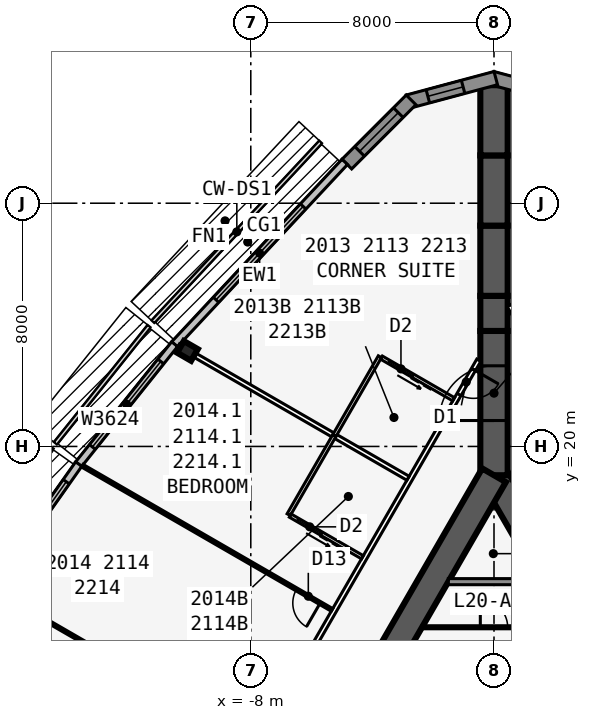
"""IFC4 building model, lengths in metres.
Left out: names, types, materials, properties, quantities, classifications, styles, units other than length and angle.
Written with IfcOpenShell. Run it as: python <this file> out.ifc"""

import sys

from ifc_helpers import new_model, si_unit, direction, frame, frame_2d, origin, origin_2d, place, context, subcontext, project, spatial, polyline, rectangle, i_section, outline, extrude, element, fill, save


model = new_model("IFC4")
c1 = context("Model", 3, precision=1e-05, world=origin(), true_north=direction((0.0, 1.0)))
c2 = subcontext(c1, "Body", "Model", "MODEL_VIEW")
j1 = project(units=[si_unit("LENGTHUNIT", "METRE"), si_unit("PLANEANGLEUNIT", "RADIAN")], contexts=[c1])
p1 = place(None, origin())
s1 = spatial("IfcSite", under=j1, at=p1, CompositionType="ELEMENT")
p2 = place(p1, origin())
s2 = spatial("IfcBuilding", under=s1, at=p2, CompositionType="ELEMENT")
p3 = place(p2, frame((0.0, 0.0, 79.5)))
s3 = spatial("IfcBuildingStorey", under=s2, at=p3, CompositionType="ELEMENT", Elevation=79.5)
p4 = place(p3, frame((16.5, -9.526, 0.0), z_axis=(0.0, 0.0, 1.0), x_axis=(-0.499999749417, 0.866025548458, 0.0)))
e1 = element("IfcWall", 1, at=p4, inside=s3, PredefinedType="SHEAR", context=c2, shape_type="SweptSolid", body=[
    extrude(rectangle(XDim=33.0, YDim=0.9, at=frame_2d((16.5, 0.0))), origin(), (0.0, 0.0, 1.0), 3.4),
])
p5 = place(p4, frame((14.15, 0.0, 0.0)))
e2 = element("IfcOpeningElement", 2, at=p5, cuts=e1, PredefinedType="OPENING", context=c2, shape_type="SweptSolid", body=[
    extrude(rectangle(XDim=1.8, YDim=2.13, at=frame_2d((0.9, 1.065))), frame((0.0, 0.46, 0.0), z_axis=(0.0, -1.0, 0.0), x_axis=(1.0, 0.0, 0.0)), (0.0, 0.0, 1.0), 0.92),
])
p6 = place(p4, frame((12.6, 0.0, 0.0)))
e3 = element("IfcOpeningElement", 3, at=p6, cuts=e1, PredefinedType="OPENING", context=c2, shape_type="SweptSolid", body=[
    extrude(rectangle(XDim=1.0, YDim=2.13, at=frame_2d((0.5, 1.065))), frame((0.0, 0.46, 0.0), z_axis=(0.0, -1.0, 0.0), x_axis=(1.0, 0.0, 0.0)), (0.0, 0.0, 1.0), 0.92),
])
p7 = place(p3, frame((0.0, 19.052, 0.0), z_axis=(0.0, 0.0, 1.0), x_axis=(-0.499999749417, -0.866025548458, 0.0)))
e4 = element("IfcWall", 4, at=p7, inside=s3, PredefinedType="SHEAR", context=c2, shape_type="SweptSolid", body=[
    extrude(rectangle(XDim=33.0, YDim=0.9, at=frame_2d((16.5, 0.0))), origin(), (0.0, 0.0, 1.0), 3.4),
])
p8 = place(p7, frame((14.15, 0.0, 0.0)))
e5 = element("IfcOpeningElement", 5, at=p8, cuts=e4, PredefinedType="OPENING", context=c2, shape_type="SweptSolid", body=[
    extrude(rectangle(XDim=1.8, YDim=2.13, at=frame_2d((0.9, 1.065))), frame((0.0, 0.46, 0.0), z_axis=(0.0, -1.0, 0.0), x_axis=(1.0, 0.0, 0.0)), (0.0, 0.0, 1.0), 0.92),
])
p9 = place(p7, frame((12.6, 0.0, 0.0)))
e6 = element("IfcOpeningElement", 6, at=p9, cuts=e4, PredefinedType="OPENING", context=c2, shape_type="SweptSolid", body=[
    extrude(rectangle(XDim=1.0, YDim=2.13, at=frame_2d((0.5, 1.065))), frame((0.0, 0.46, 0.0), z_axis=(0.0, -1.0, 0.0), x_axis=(1.0, 0.0, 0.0)), (0.0, 0.0, 1.0), 0.92),
])
p10 = place(p3, frame((0.0, 19.052, 0.0), z_axis=(0.0, 0.0, 1.0), x_axis=(0.0, 1.0, 0.0)))
e7 = element("IfcWall", 7, at=p10, inside=s3, PredefinedType="SHEAR", context=c2, shape_type="SweptSolid", body=[
    extrude(rectangle(XDim=4.746, YDim=0.9, at=frame_2d((2.373, 0.0))), origin(), (0.0, 0.0, 1.0), 3.4),
])
p11 = place(p10, frame((1.8, 0.0, 0.0)))
e8 = element("IfcOpeningElement", 8, at=p11, cuts=e7, PredefinedType="OPENING", context=c2, shape_type="SweptSolid", body=[
    extrude(rectangle(XDim=1.8, YDim=2.13, at=frame_2d((0.9, 1.065))), frame((0.0, 0.46, 0.0), z_axis=(0.0, -1.0, 0.0), x_axis=(1.0, 0.0, 0.0)), (0.0, 0.0, 1.0), 0.92),
])
p12 = place(p3, frame((0.0, 23.799, 0.0), z_axis=(0.0, 0.0, 1.0), x_axis=(0.0, 1.0, 0.0)))
e9 = element("IfcWall", 9, at=p12, inside=s3, PredefinedType="SHEAR", context=c2, shape_type="SweptSolid", body=[
    extrude(rectangle(XDim=1.155, YDim=0.9, at=frame_2d((0.577, 0.0))), origin(), (0.0, 0.0, 1.0), 3.4),
])
p13 = place(p3, frame((0.0, 24.953, 0.0), z_axis=(0.0, 0.0, 1.0), x_axis=(0.0, 1.0, 0.0)))
e10 = element("IfcWall", 10, at=p13, inside=s3, PredefinedType="SHEAR", context=c2, shape_type="SweptSolid", body=[
    extrude(rectangle(XDim=2.309, YDim=0.9, at=frame_2d((1.155, 0.0))), origin(), (0.0, 0.0, 1.0), 3.4),
])
p14 = place(p3, frame((0.0, 27.263, 0.0), z_axis=(0.0, 0.0, 1.0), x_axis=(0.0, 1.0, 0.0)))
e11 = element("IfcWall", 11, at=p14, inside=s3, PredefinedType="SHEAR", context=c2, shape_type="SweptSolid", body=[
    extrude(rectangle(XDim=2.31, YDim=0.9, at=frame_2d((1.155, 0.0))), origin(), (0.0, 0.0, 1.0), 3.4),
])
p15 = place(p3, frame((0.0, 29.572, 0.0), z_axis=(0.0, 0.0, 1.0), x_axis=(0.0, 1.0, 0.0)))
e12 = element("IfcWall", 12, at=p15, inside=s3, PredefinedType="SHEAR", context=c2, shape_type="SweptSolid", body=[
    extrude(rectangle(XDim=2.309, YDim=0.9, at=frame_2d((1.155, 0.0))), origin(), (0.0, 0.0, 1.0), 3.4),
])
p16 = place(p3, frame((-10.083, 23.142, 0.0), z_axis=(0.0, 0.0, 1.0), x_axis=(-0.5, -0.866025403784, 0.0)))
e13 = element("IfcColumn", 13, at=p16, inside=s3, PredefinedType="COLUMN", context=c2, shape_type="SweptSolid", body=[
    extrude(i_section(OverallWidth=0.442, OverallDepth=0.531, WebThickness=0.066, FlangeThickness=0.106, at=origin_2d()), origin(), (0.0, 0.0, 1.0), 3.4),
])
p17 = place(p3, frame((2.829, 31.341, 0.0), z_axis=(0.0, 0.0, 1.0), x_axis=(-0.965930548995, 0.258801419081, 0.0)))
e14 = element("IfcWall", 14, at=p17, inside=s3, PredefinedType="SOLIDWALL", context=c2, shape_type="SweptSolid", body=[
    extrude(outline(polyline([(2.989, 0.225), (2.929, 0.225), (2.438, 0.093), (2.402, 0.225), (0.0, 0.225), (0.0, -0.225), (2.989, -0.225), (2.989, 0.225)])), origin(), (0.0, 0.0, 1.0), 3.235),
])
p18 = place(p17, frame((0.676, 0.0, 0.45)))
e15 = element("IfcOpeningElement", 15, at=p18, cuts=e14, PredefinedType="OPENING", context=c2, shape_type="SweptSolid", body=[
    extrude(rectangle(XDim=1.2, YDim=2.4, at=frame_2d((0.6, 1.2))), frame((0.0, 0.235, 0.0), z_axis=(0.0, -1.0, 0.0), x_axis=(1.0, 0.0, 0.0)), (0.0, 0.0, 1.0), 0.47),
])
p19 = place(p3, frame((0.058, 32.114, 0.0), z_axis=(0.0, 0.0, 1.0), x_axis=(-0.965930548995, -0.258801419081, 0.0)))
e16 = element("IfcWall", 16, at=p19, inside=s3, PredefinedType="SOLIDWALL", context=c2, shape_type="SweptSolid", body=[
    extrude(outline(polyline([(2.989, 0.225), (0.586, 0.225), (0.551, 0.093), (0.059, 0.225), (0.0, 0.225), (0.0, -0.225), (2.989, -0.225), (2.989, 0.225)])), origin(), (0.0, 0.0, 1.0), 3.235),
])
p20 = place(p19, frame((1.113, 0.0, 0.45)))
e17 = element("IfcOpeningElement", 17, at=p20, cuts=e16, PredefinedType="OPENING", context=c2, shape_type="SweptSolid", body=[
    extrude(rectangle(XDim=1.2, YDim=2.4, at=frame_2d((0.6, 1.2))), frame((0.0, 0.235, 0.0), z_axis=(0.0, -1.0, 0.0), x_axis=(1.0, 0.0, 0.0)), (0.0, 0.0, 1.0), 0.47),
])
p21 = place(p3, frame((-2.728, 31.399, 0.0), z_axis=(0.0, 0.0, 1.0), x_axis=(-0.707106781187, -0.707106781187, 0.0)))
e18 = element("IfcWall", 18, at=p21, inside=s3, PredefinedType="SOLIDWALL", context=c2, shape_type="SweptSolid", body=[
    extrude(rectangle(XDim=2.988, YDim=0.45, at=frame_2d((1.494, 0.0))), origin(), (0.0, 0.0, 1.0), 3.235),
])
p22 = place(p21, frame((0.594, 0.0, 0.45)))
e19 = element("IfcOpeningElement", 19, at=p22, cuts=e18, PredefinedType="OPENING", context=c2, shape_type="SweptSolid", body=[
    extrude(rectangle(XDim=1.8, YDim=2.4, at=frame_2d((0.9, 1.2))), frame((0.0, 0.235, 0.0), z_axis=(0.0, -1.0, 0.0), x_axis=(1.0, 0.0, 0.0)), (0.0, 0.0, 1.0), 0.47),
])
p23 = place(p3, frame((-4.909, 29.36, 0.0), z_axis=(0.0, 0.0, 1.0), x_axis=(-0.682289646561, -0.731081964075, 0.0)))
e20 = element("IfcWall", 20, at=p23, inside=s3, PredefinedType="STANDARD", context=c2, shape_type="SweptSolid", body=[
    extrude(rectangle(XDim=8.211, YDim=0.25, at=frame_2d((4.105, 0.0))), origin(), (0.0, 0.0, 1.0), 3.235),
])
p24 = place(p23, frame((2.006, 0.0, 0.45)))
e21 = element("IfcOpeningElement", 21, at=p24, cuts=e20, PredefinedType="OPENING", context=c2, shape_type="SweptSolid", body=[
    extrude(rectangle(XDim=4.2, YDim=2.4, at=frame_2d((2.1, 1.2))), frame((0.0, 0.135, 0.0), z_axis=(0.0, -1.0, 0.0), x_axis=(1.0, 0.0, 0.0)), (0.0, 0.0, 1.0), 0.27),
])
p25 = place(p3, frame((-10.505, 23.364, 0.0), z_axis=(0.0, 0.0, 1.0), x_axis=(-0.624594965756, -0.780948864364, 0.0)))
e22 = element("IfcWall", 22, at=p25, inside=s3, PredefinedType="STANDARD", context=c2, shape_type="SweptSolid", body=[
    extrude(rectangle(XDim=5.058, YDim=0.25, at=frame_2d((2.529, 0.0))), origin(), (0.0, 0.0, 1.0), 3.235),
])
p26 = place(p25, frame((0.729, 0.0, 0.45)))
e23 = element("IfcOpeningElement", 23, at=p26, cuts=e22, PredefinedType="OPENING", context=c2, shape_type="SweptSolid", body=[
    extrude(rectangle(XDim=3.6, YDim=2.4, at=frame_2d((1.8, 1.2))), frame((0.0, 0.135, 0.0), z_axis=(0.0, -1.0, 0.0), x_axis=(1.0, 0.0, 0.0)), (0.0, 0.0, 1.0), 0.27),
])
p27 = place(p3, frame((-13.659, 19.42, 0.0), z_axis=(0.0, 0.0, 1.0), x_axis=(-0.5766431066, -0.81699616132, 0.0)))
e24 = element("IfcWall", 24, at=p27, inside=s3, PredefinedType="STANDARD", context=c2, shape_type="SweptSolid", body=[
    extrude(rectangle(XDim=5.021, YDim=0.25, at=frame_2d((2.51, 0.0))), origin(), (0.0, 0.0, 1.0), 3.235),
])
p28 = place(p27, frame((0.71, 0.0, 0.45)))
e25 = element("IfcOpeningElement", 25, at=p28, cuts=e24, PredefinedType="OPENING", context=c2, shape_type="SweptSolid", body=[
    extrude(rectangle(XDim=3.6, YDim=2.4, at=frame_2d((1.8, 1.2))), frame((0.0, 0.135, 0.0), z_axis=(0.0, -1.0, 0.0), x_axis=(1.0, 0.0, 0.0)), (0.0, 0.0, 1.0), 0.27),
])
p29 = place(p3, frame((21.586, -11.885, 0.0), z_axis=(0.0, 0.0, 1.0), x_axis=(-0.500001915564, 0.86602429783, 0.0)))
e26 = element("IfcWall", 26, at=p29, inside=s3, PredefinedType="PARTITIONING", context=c2, shape_type="SweptSolid", body=[
    extrude(rectangle(XDim=42.172, YDim=0.15, at=frame_2d((21.086, 0.0))), origin(), (0.0, 0.0, 1.0), 3.235),
])
p30 = place(p29, frame((1.911, 0.0, 0.0)))
e27 = element("IfcOpeningElement", 27, at=p30, cuts=e26, PredefinedType="OPENING", context=c2, shape_type="SweptSolid", body=[
    extrude(rectangle(XDim=0.95, YDim=2.13, at=frame_2d((0.475, 1.065))), frame((0.0, 0.085, 0.0), z_axis=(0.0, -1.0, 0.0), x_axis=(1.0, 0.0, 0.0)), (0.0, 0.0, 1.0), 0.17),
])
p31 = place(p29, frame((8.711, 0.0, 0.0)))
e28 = element("IfcOpeningElement", 28, at=p31, cuts=e26, PredefinedType="OPENING", context=c2, shape_type="SweptSolid", body=[
    extrude(rectangle(XDim=0.95, YDim=2.13, at=frame_2d((0.475, 1.065))), frame((0.0, 0.085, 0.0), z_axis=(0.0, -1.0, 0.0), x_axis=(1.0, 0.0, 0.0)), (0.0, 0.0, 1.0), 0.17),
])
p32 = place(p29, frame((13.111, 0.0, 0.0)))
e29 = element("IfcOpeningElement", 29, at=p32, cuts=e26, PredefinedType="OPENING", context=c2, shape_type="SweptSolid", body=[
    extrude(rectangle(XDim=0.95, YDim=2.13, at=frame_2d((0.475, 1.065))), frame((0.0, 0.085, 0.0), z_axis=(0.0, -1.0, 0.0), x_axis=(1.0, 0.0, 0.0)), (0.0, 0.0, 1.0), 0.17),
])
p33 = place(p29, frame((23.711, 0.0, 0.0)))
e30 = element("IfcOpeningElement", 30, at=p33, cuts=e26, PredefinedType="OPENING", context=c2, shape_type="SweptSolid", body=[
    extrude(rectangle(XDim=0.95, YDim=2.13, at=frame_2d((0.475, 1.065))), frame((0.0, 0.085, 0.0), z_axis=(0.0, -1.0, 0.0), x_axis=(1.0, 0.0, 0.0)), (0.0, 0.0, 1.0), 0.17),
])
p34 = place(p29, frame((29.311, 0.0, 0.0)))
e31 = element("IfcOpeningElement", 31, at=p34, cuts=e26, PredefinedType="OPENING", context=c2, shape_type="SweptSolid", body=[
    extrude(rectangle(XDim=0.95, YDim=2.13, at=frame_2d((0.475, 1.065))), frame((0.0, 0.085, 0.0), z_axis=(0.0, -1.0, 0.0), x_axis=(1.0, 0.0, 0.0)), (0.0, 0.0, 1.0), 0.17),
])
p35 = place(p29, frame((39.311, 0.0, 0.0)))
e32 = element("IfcOpeningElement", 32, at=p35, cuts=e26, PredefinedType="OPENING", context=c2, shape_type="SweptSolid", body=[
    extrude(rectangle(XDim=0.95, YDim=2.13, at=frame_2d((0.475, 1.065))), frame((0.0, 0.085, 0.0), z_axis=(0.0, -1.0, 0.0), x_axis=(1.0, 0.0, 0.0)), (0.0, 0.0, 1.0), 0.17),
])
p36 = place(p3, frame((-0.5, 22.836, 0.0), z_axis=(0.0, 0.0, 1.0), x_axis=(-0.500001677587, -0.866024435227, 0.0)))
e33 = element("IfcWall", 33, at=p36, inside=s3, PredefinedType="PARTITIONING", context=c2, shape_type="SweptSolid", body=[
    extrude(rectangle(XDim=39.054, YDim=0.15, at=frame_2d((19.527, 0.0))), origin(), (0.0, 0.0, 1.0), 3.235),
])
p37 = place(p36, frame((0.352, 0.0, 0.0)))
e34 = element("IfcOpeningElement", 34, at=p37, cuts=e33, PredefinedType="OPENING", context=c2, shape_type="SweptSolid", body=[
    extrude(rectangle(XDim=0.95, YDim=2.13, at=frame_2d((0.475, 1.065))), frame((0.0, 0.085, 0.0), z_axis=(0.0, -1.0, 0.0), x_axis=(1.0, 0.0, 0.0)), (0.0, 0.0, 1.0), 0.17),
])
p38 = place(p36, frame((11.552, 0.0, 0.0)))
e35 = element("IfcOpeningElement", 35, at=p38, cuts=e33, PredefinedType="OPENING", context=c2, shape_type="SweptSolid", body=[
    extrude(rectangle(XDim=0.95, YDim=2.13, at=frame_2d((0.475, 1.065))), frame((0.0, 0.085, 0.0), z_axis=(0.0, -1.0, 0.0), x_axis=(1.0, 0.0, 0.0)), (0.0, 0.0, 1.0), 0.17),
])
p39 = place(p36, frame((21.552, 0.0, 0.0)))
e36 = element("IfcOpeningElement", 36, at=p39, cuts=e33, PredefinedType="OPENING", context=c2, shape_type="SweptSolid", body=[
    extrude(rectangle(XDim=0.95, YDim=2.13, at=frame_2d((0.475, 1.065))), frame((0.0, 0.085, 0.0), z_axis=(0.0, -1.0, 0.0), x_axis=(1.0, 0.0, 0.0)), (0.0, 0.0, 1.0), 0.17),
])
p40 = place(p36, frame((36.546, 0.0, 0.0)))
e37 = element("IfcOpeningElement", 37, at=p40, cuts=e33, PredefinedType="OPENING", context=c2, shape_type="SweptSolid", body=[
    extrude(rectangle(XDim=0.95, YDim=2.13, at=frame_2d((0.475, 1.065))), frame((0.0, 0.085, 0.0), z_axis=(0.0, -1.0, 0.0), x_axis=(1.0, 0.0, 0.0)), (0.0, 0.0, 1.0), 0.17),
])
p41 = place(p3, frame((-2.829, 18.954, 0.0), z_axis=(0.0, 0.0, 1.0), x_axis=(-0.866020536561, 0.500008430184, 0.0)))
e38 = element("IfcWall", 38, at=p41, inside=s3, PredefinedType="PARTITIONING", context=c2, shape_type="SweptSolid", body=[
    extrude(rectangle(XDim=8.72, YDim=0.15, at=frame_2d((4.36, 0.0))), origin(), (0.0, 0.0, 1.0), 2.389),
])
p42 = place(p3, frame((-5.329, 14.623, 0.0), z_axis=(0.0, 0.0, 1.0), x_axis=(-0.866018409083, 0.500012114982, 0.0)))
e39 = element("IfcWall", 39, at=p42, inside=s3, PredefinedType="PARTITIONING", context=c2, shape_type="SweptSolid", body=[
    extrude(rectangle(XDim=9.485, YDim=0.1, at=frame_2d((4.742, 0.0))), origin(), (0.0, 0.0, 1.0), 2.389),
])
p43 = place(p42, frame((0.45, 0.0, 0.0)))
e40 = element("IfcOpeningElement", 40, at=p43, cuts=e39, PredefinedType="OPENING", context=c2, shape_type="SweptSolid", body=[
    extrude(rectangle(XDim=0.9, YDim=2.13, at=frame_2d((0.45, 1.065))), frame((0.0, 0.06, 0.0), z_axis=(0.0, -1.0, 0.0), x_axis=(1.0, 0.0, 0.0)), (0.0, 0.0, 1.0), 0.12),
])
p44 = place(p3, frame((-7.829, 10.293, 0.0), z_axis=(0.0, 0.0, 1.0), x_axis=(-0.866016302457, 0.50001576363, 0.0)))
e41 = element("IfcWall", 41, at=p44, inside=s3, PredefinedType="PARTITIONING", context=c2, shape_type="SweptSolid", body=[
    extrude(rectangle(XDim=9.943, YDim=0.1, at=frame_2d((4.972, 0.0))), origin(), (0.0, 0.0, 1.0), 2.389),
])
p45 = place(p44, frame((0.45, 0.0, 0.0)))
e42 = element("IfcOpeningElement", 42, at=p45, cuts=e41, PredefinedType="OPENING", context=c2, shape_type="SweptSolid", body=[
    extrude(rectangle(XDim=0.9, YDim=2.13, at=frame_2d((0.45, 1.065))), frame((0.0, 0.06, 0.0), z_axis=(0.0, -1.0, 0.0), x_axis=(1.0, 0.0, 0.0)), (0.0, 0.0, 1.0), 0.12),
])
p46 = place(p3, frame((-3.753, 22.952, 0.0), z_axis=(0.0, 0.0, 1.0), x_axis=(-0.499990139034, -0.866031096941, 0.0)))
e43 = element("IfcWall", 43, at=p46, inside=s3, PredefinedType="PLUMBINGWALL", context=c2, shape_type="SweptSolid", body=[
    extrude(rectangle(XDim=3.0, YDim=0.12, at=frame_2d((1.5, 0.0))), origin(), (0.0, 0.0, 1.0), 3.235),
])
p47 = place(p3, frame((-1.329, 21.552, 0.0), z_axis=(0.0, 0.0, 1.0), x_axis=(-0.865997131366, 0.500048966069, 0.0)))
e44 = element("IfcWall", 44, at=p47, inside=s3, PredefinedType="PLUMBINGWALL", context=c2, shape_type="SweptSolid", body=[
    extrude(rectangle(XDim=2.74, YDim=0.12, at=frame_2d((1.37, 0.0))), origin(), (0.0, 0.0, 1.0), 3.235),
])
p48 = place(p47, frame((1.55, 0.0, 0.0)))
e45 = element("IfcOpeningElement", 45, at=p48, cuts=e44, PredefinedType="OPENING", context=c2, shape_type="SweptSolid", body=[
    extrude(rectangle(XDim=0.9, YDim=2.13, at=frame_2d((0.45, 1.065))), frame((0.0, 0.07, 0.0), z_axis=(0.0, -1.0, 0.0), x_axis=(1.0, 0.0, 0.0)), (0.0, 0.0, 1.0), 0.14),
])
p49 = place(p3, frame((-5.253, 20.354, 0.0), z_axis=(0.0, 0.0, 1.0), x_axis=(-0.499990139034, -0.866031096941, 0.0)))
e46 = element("IfcWall", 46, at=p49, inside=s3, PredefinedType="PLUMBINGWALL", context=c2, shape_type="SweptSolid", body=[
    extrude(rectangle(XDim=3.0, YDim=0.12, at=frame_2d((1.5, 0.0))), origin(), (0.0, 0.0, 1.0), 3.235),
])
p50 = place(p3, frame((-4.329, 16.355, 0.0), z_axis=(0.0, 0.0, 1.0), x_axis=(-0.866035715982, 0.499982138324, 0.0)))
e47 = element("IfcWall", 47, at=p50, inside=s3, PredefinedType="PLUMBINGWALL", context=c2, shape_type="SweptSolid", body=[
    extrude(rectangle(XDim=2.74, YDim=0.12, at=frame_2d((1.37, 0.0))), origin(), (0.0, 0.0, 1.0), 3.235),
])
p51 = place(p50, frame((1.55, 0.0, 0.0)))
e48 = element("IfcOpeningElement", 48, at=p51, cuts=e47, PredefinedType="OPENING", context=c2, shape_type="SweptSolid", body=[
    extrude(rectangle(XDim=0.9, YDim=2.13, at=frame_2d((0.45, 1.065))), frame((0.0, 0.07, 0.0), z_axis=(0.0, -1.0, 0.0), x_axis=(1.0, 0.0, 0.0)), (0.0, 0.0, 1.0), 0.14),
])
p52 = place(p3, frame((-1.501, 15.552, 0.0), z_axis=(0.0, 0.0, 1.0), x_axis=(1.0, 0.0, 0.0)))
e49 = element("IfcWall", 49, at=p52, inside=s3, PredefinedType="SOLIDWALL", context=c2, shape_type="SweptSolid", body=[
    extrude(rectangle(XDim=3.002, YDim=0.2, at=frame_2d((1.501, 0.0))), origin(), (0.0, 0.0, 1.0), 3.235),
])
p53 = place(p3, frame((-2.367, 14.052, 0.0), z_axis=(0.0, 0.0, 1.0), x_axis=(1.0, 0.0, 0.0)))
e50 = element("IfcWall", 50, at=p53, inside=s3, PredefinedType="PARTITIONING", context=c2, shape_type="SweptSolid", body=[
    extrude(rectangle(XDim=4.734, YDim=0.1, at=frame_2d((2.367, 0.0))), origin(), (0.0, 0.0, 1.0), 3.235),
])
p54 = place(p53, frame((1.917, 0.0, 0.0)))
e51 = element("IfcOpeningElement", 51, at=p54, cuts=e50, PredefinedType="OPENING", context=c2, shape_type="SweptSolid", body=[
    extrude(rectangle(XDim=0.9, YDim=2.13, at=frame_2d((0.45, 1.065))), frame((0.0, 0.06, 0.0), z_axis=(0.0, -1.0, 0.0), x_axis=(1.0, 0.0, 0.0)), (0.0, 0.0, 1.0), 0.12),
])
p55 = place(p20, origin())
e52 = element("IfcWindow", 52, at=p55, inside=s3, PartitioningType="SINGLE_PANEL", PredefinedType="WINDOW", context=c2, shape_type="SweptSolid", body=[
    extrude(rectangle(XDim=1.2, YDim=2.4, at=frame_2d((0.6, 1.2))), frame((0.0, 0.03, 0.0), z_axis=(0.0, -1.0, 0.0), x_axis=(1.0, 0.0, 0.0)), (0.0, 0.0, 1.0), 0.06),
])
fill(e17, e52)
p56 = place(p22, origin())
e53 = element("IfcWindow", 53, at=p56, inside=s3, PartitioningType="SINGLE_PANEL", PredefinedType="WINDOW", context=c2, shape_type="SweptSolid", body=[
    extrude(rectangle(XDim=1.8, YDim=2.4, at=frame_2d((0.9, 1.2))), frame((0.0, 0.03, 0.0), z_axis=(0.0, -1.0, 0.0), x_axis=(1.0, 0.0, 0.0)), (0.0, 0.0, 1.0), 0.06),
])
fill(e19, e53)
p57 = place(p24, origin())
e54 = element("IfcWindow", 54, at=p57, inside=s3, PartitioningType="SINGLE_PANEL", PredefinedType="WINDOW", context=c2, shape_type="SweptSolid", body=[
    extrude(rectangle(XDim=4.2, YDim=2.4, at=frame_2d((2.1, 1.2))), frame((0.0, 0.03, 0.0), z_axis=(0.0, -1.0, 0.0), x_axis=(1.0, 0.0, 0.0)), (0.0, 0.0, 1.0), 0.06),
])
fill(e21, e54)
p58 = place(p26, origin())
e55 = element("IfcWindow", 55, at=p58, inside=s3, PartitioningType="SINGLE_PANEL", PredefinedType="WINDOW", context=c2, shape_type="SweptSolid", body=[
    extrude(rectangle(XDim=3.6, YDim=2.4, at=frame_2d((1.8, 1.2))), frame((0.0, 0.03, 0.0), z_axis=(0.0, -1.0, 0.0), x_axis=(1.0, 0.0, 0.0)), (0.0, 0.0, 1.0), 0.06),
])
fill(e23, e55)
p59 = place(p28, origin())
e56 = element("IfcWindow", 56, at=p59, inside=s3, PartitioningType="SINGLE_PANEL", PredefinedType="WINDOW", context=c2, shape_type="SweptSolid", body=[
    extrude(rectangle(XDim=3.6, YDim=2.4, at=frame_2d((1.8, 1.2))), frame((0.0, 0.03, 0.0), z_axis=(0.0, -1.0, 0.0), x_axis=(1.0, 0.0, 0.0)), (0.0, 0.0, 1.0), 0.06),
])
fill(e25, e56)
p60 = place(p43, origin())
e57 = element("IfcDoor", 57, at=p60, inside=s3, OperationType="SINGLE_SWING_LEFT", PredefinedType="DOOR", context=c2, shape_type="SweptSolid", body=[
    extrude(rectangle(XDim=0.9, YDim=2.13, at=frame_2d((0.45, 1.065))), frame((0.0, 0.025, 0.0), z_axis=(0.0, -1.0, 0.0), x_axis=(1.0, 0.0, 0.0)), (0.0, 0.0, 1.0), 0.05),
])
fill(e40, e57)
p61 = place(p48, origin())
e58 = element("IfcDoor", 58, at=p61, inside=s3, OperationType="SLIDING_TO_LEFT", PredefinedType="DOOR", context=c2, shape_type="SweptSolid", body=[
    extrude(rectangle(XDim=0.9, YDim=2.13, at=frame_2d((0.45, 1.065))), frame((0.0, 0.025, 0.0), z_axis=(0.0, -1.0, 0.0), x_axis=(1.0, 0.0, 0.0)), (0.0, 0.0, 1.0), 0.05),
])
fill(e45, e58)
p62 = place(p37, origin())
e59 = element("IfcDoor", 59, at=p62, inside=s3, OperationType="SINGLE_SWING_LEFT", PredefinedType="DOOR", context=c2, shape_type="SweptSolid", body=[
    extrude(rectangle(XDim=0.95, YDim=2.13, at=frame_2d((0.475, 1.065))), frame((0.0, 0.025, 0.0), z_axis=(0.0, -1.0, 0.0), x_axis=(1.0, 0.0, 0.0)), (0.0, 0.0, 1.0), 0.05),
])
fill(e34, e59)
p63 = place(p51, origin())
e60 = element("IfcDoor", 60, at=p63, inside=s3, OperationType="SLIDING_TO_LEFT", PredefinedType="DOOR", context=c2, shape_type="SweptSolid", body=[
    extrude(rectangle(XDim=0.9, YDim=2.13, at=frame_2d((0.45, 1.065))), frame((0.0, 0.025, 0.0), z_axis=(0.0, -1.0, 0.0), x_axis=(1.0, 0.0, 0.0)), (0.0, 0.0, 1.0), 0.05),
])
fill(e48, e60)
p64 = place(p11, origin())
e61 = element("IfcDoor", 61, at=p64, inside=s3, OperationType="DOUBLE_DOOR_DOUBLE_SWING", PredefinedType="DOOR", context=c2, shape_type="SweptSolid", body=[
    extrude(rectangle(XDim=1.8, YDim=2.13, at=frame_2d((0.9, 1.065))), frame((0.0, 0.025, 0.0), z_axis=(0.0, -1.0, 0.0), x_axis=(1.0, 0.0, 0.0)), (0.0, 0.0, 1.0), 0.05),
])
fill(e8, e61)
p65 = place(p54, origin())
e62 = element("IfcDoor", 62, at=p65, inside=s3, OperationType="SINGLE_SWING_LEFT", PredefinedType="DOOR", context=c2, shape_type="SweptSolid", body=[
    extrude(rectangle(XDim=0.9, YDim=2.13, at=frame_2d((0.45, 1.065))), frame((0.0, 0.025, 0.0), z_axis=(0.0, -1.0, 0.0), x_axis=(1.0, 0.0, 0.0)), (0.0, 0.0, 1.0), 0.05),
])
fill(e51, e62)
save(model, sys.argv[1])
